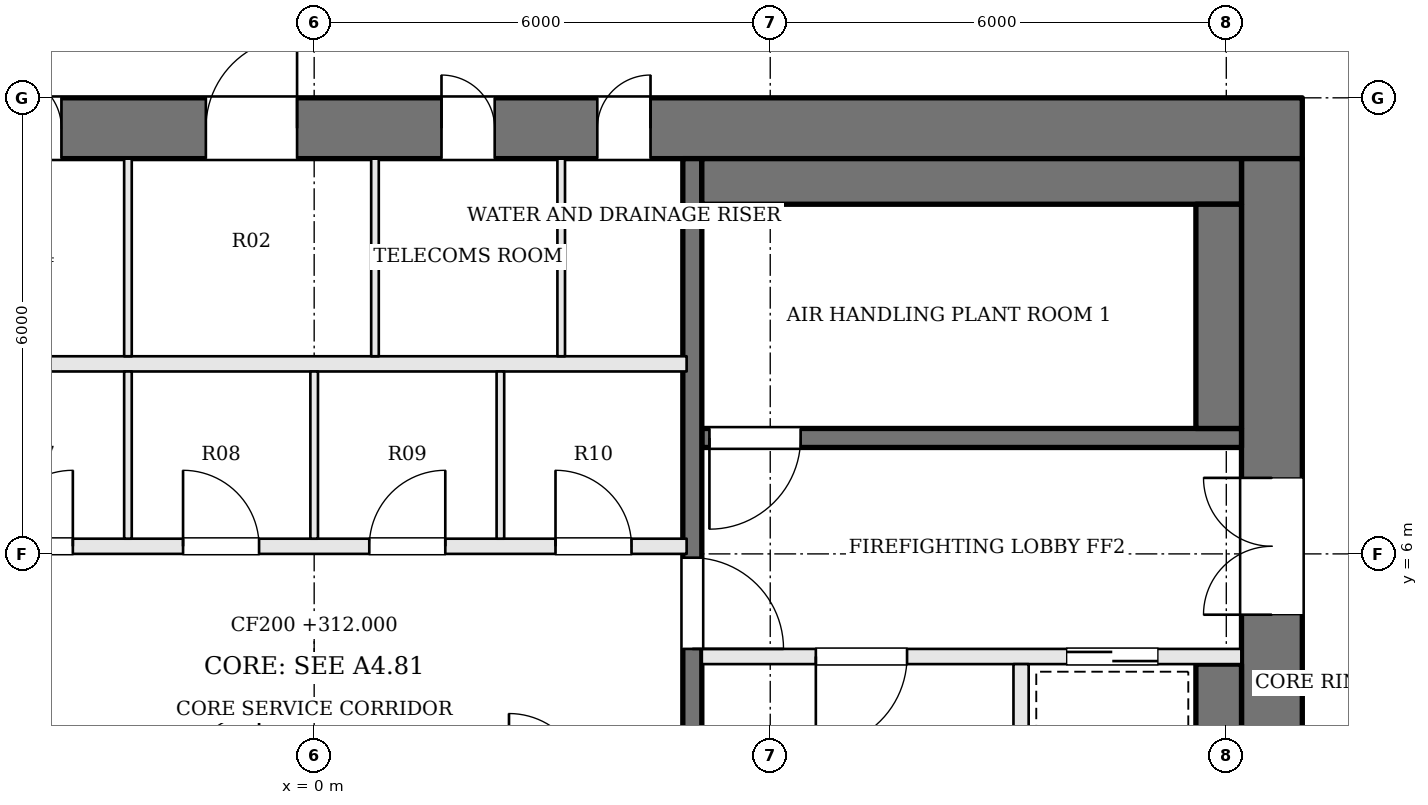
"""IFC4 building model, lengths in metres.
Left out: names, types, materials, properties, quantities, classifications, styles, units other than length and angle.
Written with IfcOpenShell. Run it as: python <this file> out.ifc"""

import sys

from ifc_helpers import new_model, si_unit, direction, frame, frame_2d, origin, place, context, subcontext, project, spatial, rectangle, extrude, element, fill, save


model = new_model("IFC4")
c1 = context("Model", 3, precision=1e-05, world=origin(), true_north=direction((0.0, 1.0)))
c2 = subcontext(c1, "Body", "Model", "MODEL_VIEW")
j1 = project(units=[si_unit("LENGTHUNIT", "METRE"), si_unit("PLANEANGLEUNIT", "RADIAN")], contexts=[c1])
p1 = place(None, origin())
s1 = spatial("IfcSite", under=j1, at=p1, CompositionType="ELEMENT")
p2 = place(p1, origin())
s2 = spatial("IfcBuilding", under=s1, at=p2, CompositionType="ELEMENT")
p3 = place(p2, frame((0.0, 0.0, 312.0)))
s3 = spatial("IfcBuildingStorey", under=s2, at=p3, CompositionType="ELEMENT", Elevation=312.0)
p4 = place(p3, frame((-13.0, 11.6, 0.0), z_axis=(0.0, 0.0, 1.0), x_axis=(1.0, 0.0, 0.0)))
e1 = element("IfcWall", 1, at=p4, inside=s3, PredefinedType="SHEAR", context=c2, shape_type="SweptSolid", body=[
    extrude(rectangle(XDim=26.0, YDim=0.8, at=frame_2d((13.0, 0.0))), origin(), (0.0, 0.0, 1.0), 4.2),
])
p5 = place(p4, frame((8.975, 0.0, 0.0)))
e2 = element("IfcOpeningElement", 2, at=p5, cuts=e1, PredefinedType="OPENING", context=c2, shape_type="SweptSolid", body=[
    extrude(rectangle(XDim=0.7, YDim=2.1, at=frame_2d((0.35, 1.05))), frame((0.0, 0.41, 0.0), z_axis=(0.0, -1.0, 0.0), x_axis=(1.0, 0.0, 0.0)), (0.0, 0.0, 1.0), 0.82),
])
p6 = place(p4, frame((11.575, 0.0, 0.0)))
e3 = element("IfcOpeningElement", 3, at=p6, cuts=e1, PredefinedType="OPENING", context=c2, shape_type="SweptSolid", body=[
    extrude(rectangle(XDim=1.2, YDim=2.1, at=frame_2d((0.6, 1.05))), frame((0.0, 0.41, 0.0), z_axis=(0.0, -1.0, 0.0), x_axis=(1.0, 0.0, 0.0)), (0.0, 0.0, 1.0), 0.82),
])
p7 = place(p4, frame((14.675, 0.0, 0.0)))
e4 = element("IfcOpeningElement", 4, at=p7, cuts=e1, PredefinedType="OPENING", context=c2, shape_type="SweptSolid", body=[
    extrude(rectangle(XDim=0.7, YDim=2.1, at=frame_2d((0.35, 1.05))), frame((0.0, 0.41, 0.0), z_axis=(0.0, -1.0, 0.0), x_axis=(1.0, 0.0, 0.0)), (0.0, 0.0, 1.0), 0.82),
])
p8 = place(p4, frame((16.725, 0.0, 0.0)))
e5 = element("IfcOpeningElement", 5, at=p8, cuts=e1, PredefinedType="OPENING", context=c2, shape_type="SweptSolid", body=[
    extrude(rectangle(XDim=0.7, YDim=2.1, at=frame_2d((0.35, 1.05))), frame((0.0, 0.41, 0.0), z_axis=(0.0, -1.0, 0.0), x_axis=(1.0, 0.0, 0.0)), (0.0, 0.0, 1.0), 0.82),
])
p9 = place(p3, frame((12.6, -2.2, 0.0), z_axis=(0.0, 0.0, 1.0), x_axis=(0.0, 1.0, 0.0)))
e6 = element("IfcWall", 6, at=p9, inside=s3, PredefinedType="SHEAR", context=c2, shape_type="SweptSolid", body=[
    extrude(rectangle(XDim=13.4, YDim=0.8, at=frame_2d((6.7, 0.0))), origin(), (0.0, 0.0, 1.0), 4.2),
])
p10 = place(p9, frame((7.4, 0.0, 0.0)))
e7 = element("IfcOpeningElement", 7, at=p10, cuts=e6, PredefinedType="OPENING", context=c2, shape_type="SweptSolid", body=[
    extrude(rectangle(XDim=1.8, YDim=2.1, at=frame_2d((0.9, 1.05))), frame((0.0, 0.41, 0.0), z_axis=(0.0, -1.0, 0.0), x_axis=(1.0, 0.0, 0.0)), (0.0, 0.0, 1.0), 0.82),
])
p11 = place(p3, frame((12.2, 7.525, 0.0), z_axis=(0.0, 0.0, 1.0), x_axis=(-1.0, 0.0, 0.0)))
e8 = element("IfcWall", 8, at=p11, inside=s3, PredefinedType="SOLIDWALL", context=c2, shape_type="SweptSolid", body=[
    extrude(rectangle(XDim=7.1, YDim=0.25, at=frame_2d((3.55, 0.0))), origin(), (0.0, 0.0, 1.0), 4.0),
])
p12 = place(p11, frame((5.8, 0.0, 0.0)))
e9 = element("IfcOpeningElement", 9, at=p12, cuts=e8, PredefinedType="OPENING", context=c2, shape_type="SweptSolid", body=[
    extrude(rectangle(XDim=1.2, YDim=2.1, at=frame_2d((0.6, 1.05))), frame((0.0, 0.135, 0.0), z_axis=(0.0, -1.0, 0.0), x_axis=(1.0, 0.0, 0.0)), (0.0, 0.0, 1.0), 0.27),
])
p13 = place(p3, frame((12.2, 4.65, 0.0), z_axis=(0.0, 0.0, 1.0), x_axis=(-1.0, 0.0, 0.0)))
e10 = element("IfcWall", 10, at=p13, inside=s3, PredefinedType="SOLIDWALL", context=c2, shape_type="SweptSolid", body=[
    extrude(rectangle(XDim=7.1, YDim=0.2, at=frame_2d((3.55, 0.0))), origin(), (0.0, 0.0, 1.0), 4.0),
])
p14 = place(p13, frame((4.4, 0.0, 0.0)))
e11 = element("IfcOpeningElement", 11, at=p14, cuts=e10, PredefinedType="OPENING", context=c2, shape_type="SweptSolid", body=[
    extrude(rectangle(XDim=1.2, YDim=2.1, at=frame_2d((0.6, 1.05))), frame((0.0, 0.11, 0.0), z_axis=(0.0, -1.0, 0.0), x_axis=(1.0, 0.0, 0.0)), (0.0, 0.0, 1.0), 0.22),
])
p15 = place(p13, frame((1.1, 0.0, 0.0)))
e12 = element("IfcOpeningElement", 12, at=p15, cuts=e10, PredefinedType="OPENING", context=c2, shape_type="SweptSolid", body=[
    extrude(rectangle(XDim=1.2, YDim=2.1, at=frame_2d((0.6, 1.05))), frame((0.0, 0.11, 0.0), z_axis=(0.0, -1.0, 0.0), x_axis=(1.0, 0.0, 0.0)), (0.0, 0.0, 1.0), 0.22),
])
p16 = place(p3, frame((9.3, 4.55, 0.0), z_axis=(0.0, 0.0, 1.0), x_axis=(0.0, -1.0, 0.0)))
e13 = element("IfcWall", 13, at=p16, inside=s3, PredefinedType="SOLIDWALL", context=c2, shape_type="SweptSolid", body=[
    extrude(rectangle(XDim=3.0, YDim=0.2, at=frame_2d((1.5, 0.0))), origin(), (0.0, 0.0, 1.0), 4.0),
])
p17 = place(p3, frame((4.975, 11.2, 0.0), z_axis=(0.0, 0.0, 1.0), x_axis=(0.0, -1.0, 0.0)))
e14 = element("IfcWall", 14, at=p17, inside=s3, PredefinedType="SOLIDWALL", context=c2, shape_type="SweptSolid", body=[
    extrude(rectangle(XDim=13.4, YDim=0.25, at=frame_2d((6.7, 0.0))), origin(), (0.0, 0.0, 1.0), 4.0),
])
p18 = place(p17, frame((5.25, 0.0, 0.0)))
e15 = element("IfcOpeningElement", 15, at=p18, cuts=e14, PredefinedType="OPENING", context=c2, shape_type="SweptSolid", body=[
    extrude(rectangle(XDim=1.2, YDim=2.1, at=frame_2d((0.6, 1.05))), frame((0.0, 0.135, 0.0), z_axis=(0.0, -1.0, 0.0), x_axis=(1.0, 0.0, 0.0)), (0.0, 0.0, 1.0), 0.27),
])
p19 = place(p3, frame((12.2, 10.9, 0.0), z_axis=(0.0, 0.0, 1.0), x_axis=(-1.0, 0.0, 0.0)))
e16 = element("IfcWall", 16, at=p19, inside=s3, PredefinedType="SOLIDWALL", context=c2, shape_type="SweptSolid", body=[
    extrude(rectangle(XDim=7.1, YDim=0.6, at=frame_2d((3.55, 0.0))), origin(), (0.0, 0.0, 1.0), 4.0),
])
p20 = place(p3, frame((11.9, 10.6, 0.0), z_axis=(0.0, 0.0, 1.0), x_axis=(0.0, -1.0, 0.0)))
e17 = element("IfcWall", 17, at=p20, inside=s3, PredefinedType="SOLIDWALL", context=c2, shape_type="SweptSolid", body=[
    extrude(rectangle(XDim=2.95, YDim=0.6, at=frame_2d((1.475, 0.0))), origin(), (0.0, 0.0, 1.0), 4.0),
])
p21 = place(p3, frame((11.9, 4.55, 0.0), z_axis=(0.0, 0.0, 1.0), x_axis=(0.0, -1.0, 0.0)))
e18 = element("IfcWall", 18, at=p21, inside=s3, PredefinedType="SOLIDWALL", context=c2, shape_type="SweptSolid", body=[
    extrude(rectangle(XDim=3.0, YDim=0.6, at=frame_2d((1.5, 0.0))), origin(), (0.0, 0.0, 1.0), 4.0),
])
p22 = place(p3, frame((-4.9, 6.1, 0.0), z_axis=(0.0, 0.0, 1.0), x_axis=(1.0, 0.0, 0.0)))
e19 = element("IfcWall", 19, at=p22, inside=s3, PredefinedType="SOLIDWALL", context=c2, shape_type="SweptSolid", body=[
    extrude(rectangle(XDim=9.8, YDim=0.2, at=frame_2d((4.9, 0.0))), origin(), (0.0, 0.0, 1.0), 4.0),
])
p23 = place(p22, frame((0.725, 0.0, 0.0)))
e20 = element("IfcOpeningElement", 20, at=p23, cuts=e19, PredefinedType="OPENING", context=c2, shape_type="SweptSolid", body=[
    extrude(rectangle(XDim=1.0, YDim=2.1, at=frame_2d((0.5, 1.05))), frame((0.0, 0.11, 0.0), z_axis=(0.0, -1.0, 0.0), x_axis=(1.0, 0.0, 0.0)), (0.0, 0.0, 1.0), 0.22),
])
p24 = place(p22, frame((3.175, 0.0, 0.0)))
e21 = element("IfcOpeningElement", 21, at=p24, cuts=e19, PredefinedType="OPENING", context=c2, shape_type="SweptSolid", body=[
    extrude(rectangle(XDim=1.0, YDim=2.1, at=frame_2d((0.5, 1.05))), frame((0.0, 0.11, 0.0), z_axis=(0.0, -1.0, 0.0), x_axis=(1.0, 0.0, 0.0)), (0.0, 0.0, 1.0), 0.22),
])
p25 = place(p22, frame((5.625, 0.0, 0.0)))
e22 = element("IfcOpeningElement", 22, at=p25, cuts=e19, PredefinedType="OPENING", context=c2, shape_type="SweptSolid", body=[
    extrude(rectangle(XDim=1.0, YDim=2.1, at=frame_2d((0.5, 1.05))), frame((0.0, 0.11, 0.0), z_axis=(0.0, -1.0, 0.0), x_axis=(1.0, 0.0, 0.0)), (0.0, 0.0, 1.0), 0.22),
])
p26 = place(p22, frame((8.075, 0.0, 0.0)))
e23 = element("IfcOpeningElement", 23, at=p26, cuts=e19, PredefinedType="OPENING", context=c2, shape_type="SweptSolid", body=[
    extrude(rectangle(XDim=1.0, YDim=2.1, at=frame_2d((0.5, 1.05))), frame((0.0, 0.11, 0.0), z_axis=(0.0, -1.0, 0.0), x_axis=(1.0, 0.0, 0.0)), (0.0, 0.0, 1.0), 0.22),
])
p27 = place(p3, frame((-4.9, 8.5, 0.0), z_axis=(0.0, 0.0, 1.0), x_axis=(1.0, 0.0, 0.0)))
e24 = element("IfcWall", 24, at=p27, inside=s3, PredefinedType="SOLIDWALL", context=c2, shape_type="SweptSolid", body=[
    extrude(rectangle(XDim=9.8, YDim=0.2, at=frame_2d((4.9, 0.0))), origin(), (0.0, 0.0, 1.0), 4.0),
])
for number, where, z_axis, x_axis in (
    (25, (-2.45, 6.2, 0.0), (0.0, 0.0, 1.0), (0.0, 1.0, 0.0)),
    (26, (0.0, 6.2, 0.0), (0.0, 0.0, 1.0), (0.0, 1.0, 0.0)),
    (27, (2.45, 6.2, 0.0), (0.0, 0.0, 1.0), (0.0, 1.0, 0.0)),
):
    element("IfcWall", number, at=place(p3, frame(where, z_axis=z_axis, x_axis=x_axis)), inside=s3, PredefinedType="PARTITIONING", context=c2, shape_type="SweptSolid", body=[
        extrude(rectangle(XDim=2.2, YDim=0.1, at=frame_2d((1.1, 0.0))), origin(), (0.0, 0.0, 1.0), 4.0),
    ])
for number, where, z_axis, x_axis in (
    (28, (-2.45, 8.6, 0.0), (0.0, 0.0, 1.0), (0.0, 1.0, 0.0)),
    (29, (0.8, 8.6, 0.0), (0.0, 0.0, 1.0), (0.0, 1.0, 0.0)),
    (30, (3.25, 8.6, 0.0), (0.0, 0.0, 1.0), (0.0, 1.0, 0.0)),
):
    element("IfcWall", number, at=place(p3, frame(where, z_axis=z_axis, x_axis=x_axis)), inside=s3, PredefinedType="PARTITIONING", context=c2, shape_type="SweptSolid", body=[
        extrude(rectangle(XDim=2.6, YDim=0.1, at=frame_2d((1.3, 0.0))), origin(), (0.0, 0.0, 1.0), 4.0),
    ])
p28 = place(p10, origin())
e31 = element("IfcDoor", 31, at=p28, inside=s3, OperationType="DOUBLE_DOOR_SINGLE_SWING", PredefinedType="DOOR", context=c2, shape_type="SweptSolid", body=[
    extrude(rectangle(XDim=1.8, YDim=2.1, at=frame_2d((0.9, 1.05))), frame((0.0, 0.025, 0.0), z_axis=(0.0, -1.0, 0.0), x_axis=(1.0, 0.0, 0.0)), (0.0, 0.0, 1.0), 0.05),
])
fill(e7, e31)
p29 = place(p18, origin())
e32 = element("IfcDoor", 32, at=p29, inside=s3, OperationType="SINGLE_SWING_RIGHT", PredefinedType="DOOR", context=c2, shape_type="SweptSolid", body=[
    extrude(rectangle(XDim=1.2, YDim=2.1, at=frame_2d((0.6, 1.05))), frame((0.0, 0.025, 0.0), z_axis=(0.0, -1.0, 0.0), x_axis=(1.0, 0.0, 0.0)), (0.0, 0.0, 1.0), 0.05),
])
fill(e15, e32)
p30 = place(p14, origin())
e33 = element("IfcDoor", 33, at=p30, inside=s3, OperationType="SINGLE_SWING_RIGHT", PredefinedType="DOOR", context=c2, shape_type="SweptSolid", body=[
    extrude(rectangle(XDim=1.2, YDim=2.1, at=frame_2d((0.6, 1.05))), frame((0.0, 0.025, 0.0), z_axis=(0.0, -1.0, 0.0), x_axis=(1.0, 0.0, 0.0)), (0.0, 0.0, 1.0), 0.05),
])
fill(e11, e33)
p31 = place(p12, origin())
e34 = element("IfcDoor", 34, at=p31, inside=s3, OperationType="SINGLE_SWING_RIGHT", PredefinedType="DOOR", context=c2, shape_type="SweptSolid", body=[
    extrude(rectangle(XDim=1.2, YDim=2.1, at=frame_2d((0.6, 1.05))), frame((0.0, 0.025, 0.0), z_axis=(0.0, -1.0, 0.0), x_axis=(1.0, 0.0, 0.0)), (0.0, 0.0, 1.0), 0.05),
])
fill(e9, e34)
p32 = place(p15, origin())
e35 = element("IfcDoor", 35, at=p32, inside=s3, OperationType="SLIDING_TO_RIGHT", PredefinedType="DOOR", context=c2, shape_type="SweptSolid", body=[
    extrude(rectangle(XDim=1.2, YDim=2.1, at=frame_2d((0.6, 1.05))), frame((0.0, 0.025, 0.0), z_axis=(0.0, -1.0, 0.0), x_axis=(1.0, 0.0, 0.0)), (0.0, 0.0, 1.0), 0.05),
])
fill(e12, e35)
p33 = place(p23, origin())
e36 = element("IfcDoor", 36, at=p33, inside=s3, OperationType="SINGLE_SWING_RIGHT", PredefinedType="DOOR", context=c2, shape_type="SweptSolid", body=[
    extrude(rectangle(XDim=1.0, YDim=2.1, at=frame_2d((0.5, 1.05))), frame((0.0, 0.025, 0.0), z_axis=(0.0, -1.0, 0.0), x_axis=(1.0, 0.0, 0.0)), (0.0, 0.0, 1.0), 0.05),
])
fill(e20, e36)
p34 = place(p24, origin())
e37 = element("IfcDoor", 37, at=p34, inside=s3, OperationType="SINGLE_SWING_LEFT", PredefinedType="DOOR", context=c2, shape_type="SweptSolid", body=[
    extrude(rectangle(XDim=1.0, YDim=2.1, at=frame_2d((0.5, 1.05))), frame((0.0, 0.025, 0.0), z_axis=(0.0, -1.0, 0.0), x_axis=(1.0, 0.0, 0.0)), (0.0, 0.0, 1.0), 0.05),
])
fill(e21, e37)
p35 = place(p25, origin())
e38 = element("IfcDoor", 38, at=p35, inside=s3, OperationType="SINGLE_SWING_RIGHT", PredefinedType="DOOR", context=c2, shape_type="SweptSolid", body=[
    extrude(rectangle(XDim=1.0, YDim=2.1, at=frame_2d((0.5, 1.05))), frame((0.0, 0.025, 0.0), z_axis=(0.0, -1.0, 0.0), x_axis=(1.0, 0.0, 0.0)), (0.0, 0.0, 1.0), 0.05),
])
fill(e22, e38)
p36 = place(p26, origin())
e39 = element("IfcDoor", 39, at=p36, inside=s3, OperationType="SINGLE_SWING_LEFT", PredefinedType="DOOR", context=c2, shape_type="SweptSolid", body=[
    extrude(rectangle(XDim=1.0, YDim=2.1, at=frame_2d((0.5, 1.05))), frame((0.0, 0.025, 0.0), z_axis=(0.0, -1.0, 0.0), x_axis=(1.0, 0.0, 0.0)), (0.0, 0.0, 1.0), 0.05),
])
fill(e23, e39)
p37 = place(p5, origin())
e40 = element("IfcDoor", 40, at=p37, inside=s3, OperationType="SINGLE_SWING_LEFT", PredefinedType="DOOR", context=c2, shape_type="SweptSolid", body=[
    extrude(rectangle(XDim=0.7, YDim=2.1, at=frame_2d((0.35, 1.05))), frame((0.0, 0.025, 0.0), z_axis=(0.0, -1.0, 0.0), x_axis=(1.0, 0.0, 0.0)), (0.0, 0.0, 1.0), 0.05),
])
fill(e2, e40)
p38 = place(p6, origin())
e41 = element("IfcDoor", 41, at=p38, inside=s3, OperationType="SINGLE_SWING_RIGHT", PredefinedType="DOOR", context=c2, shape_type="SweptSolid", body=[
    extrude(rectangle(XDim=1.2, YDim=2.1, at=frame_2d((0.6, 1.05))), frame((0.0, 0.025, 0.0), z_axis=(0.0, -1.0, 0.0), x_axis=(1.0, 0.0, 0.0)), (0.0, 0.0, 1.0), 0.05),
])
fill(e3, e41)
p39 = place(p7, origin())
e42 = element("IfcDoor", 42, at=p39, inside=s3, OperationType="SINGLE_SWING_LEFT", PredefinedType="DOOR", context=c2, shape_type="SweptSolid", body=[
    extrude(rectangle(XDim=0.7, YDim=2.1, at=frame_2d((0.35, 1.05))), frame((0.0, 0.025, 0.0), z_axis=(0.0, -1.0, 0.0), x_axis=(1.0, 0.0, 0.0)), (0.0, 0.0, 1.0), 0.05),
])
fill(e4, e42)
p40 = place(p8, origin())
e43 = element("IfcDoor", 43, at=p40, inside=s3, OperationType="SINGLE_SWING_RIGHT", PredefinedType="DOOR", context=c2, shape_type="SweptSolid", body=[
    extrude(rectangle(XDim=0.7, YDim=2.1, at=frame_2d((0.35, 1.05))), frame((0.0, 0.025, 0.0), z_axis=(0.0, -1.0, 0.0), x_axis=(1.0, 0.0, 0.0)), (0.0, 0.0, 1.0), 0.05),
])
fill(e5, e43)
save(model, sys.argv[1])
